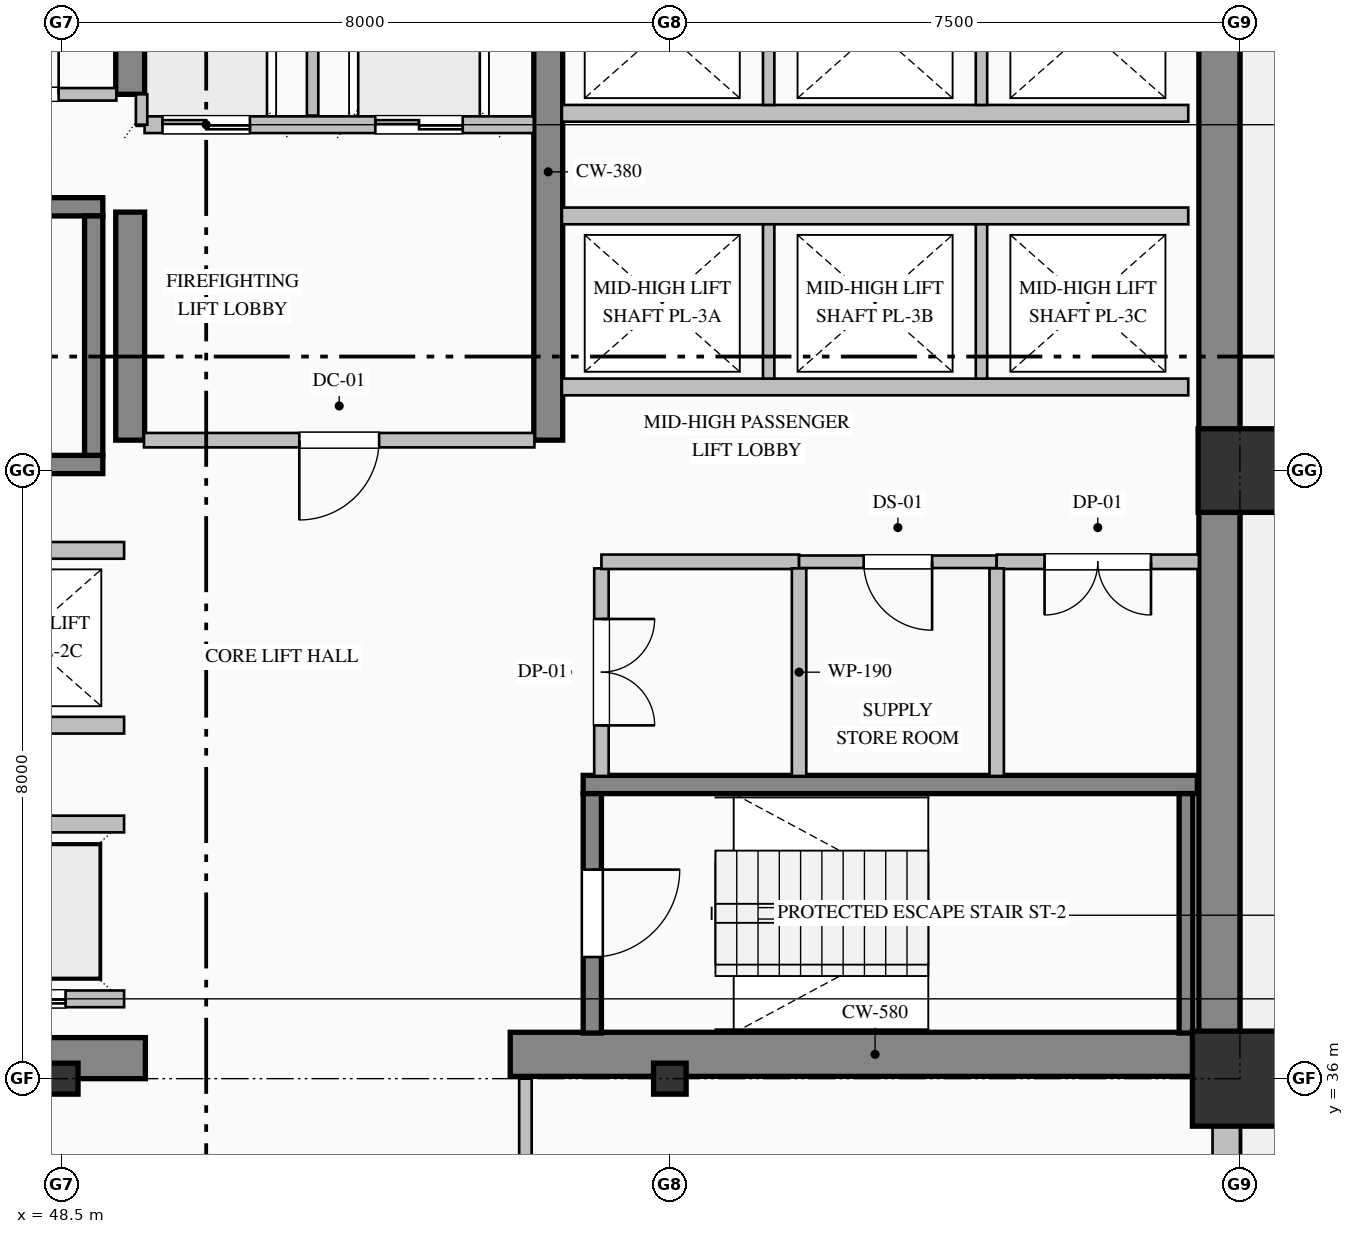
"""IFC4 building model, lengths in metres.
Left out: names, types, materials, properties, quantities, classifications, styles, units other than length and angle.
Written with IfcOpenShell. Run it as: python <this file> out.ifc"""

import sys

from ifc_helpers import new_model, si_unit, direction, frame, frame_2d, origin, origin_2d, place, context, subcontext, project, spatial, rectangle, hollow_rectangle, i_section, extrude, element, fill, save


model = new_model("IFC4")
c1 = context("Model", 3, precision=1e-05, world=origin(), true_north=direction((0.0, 1.0)))
c2 = subcontext(c1, "Body", "Model", "MODEL_VIEW")
j1 = project(units=[si_unit("LENGTHUNIT", "METRE"), si_unit("PLANEANGLEUNIT", "RADIAN")], contexts=[c1])
p1 = place(None, origin())
s1 = spatial("IfcSite", under=j1, at=p1, CompositionType="ELEMENT")
p2 = place(p1, origin())
s2 = spatial("IfcBuilding", under=s1, at=p2, CompositionType="ELEMENT")
p3 = place(p2, frame((0.0, 0.0, 28.2)))
s3 = spatial("IfcBuildingStorey", under=s2, at=p3, CompositionType="ELEMENT", Elevation=28.2)
p4 = place(p3, frame((63.73, 36.32, 0.0), z_axis=(0.0, 0.0, 1.0), x_axis=(0.0, 1.0, 0.0)))
e1 = element("IfcWall", 1, at=p4, inside=s3, PredefinedType="SHEAR", context=c2, shape_type="SweptSolid", body=[
    extrude(rectangle(XDim=15.14, YDim=0.54, at=frame_2d((7.57, 0.0))), origin(), (0.0, 0.0, 1.0), 3.75),
])
p5 = place(p3, frame((48.2, 36.27, 0.0), z_axis=(0.0, 0.0, 1.0), x_axis=(1.0, 0.0, 0.0)))
e2 = element("IfcWall", 2, at=p5, inside=s3, PredefinedType="SHEAR", context=c2, shape_type="SweptSolid", body=[
    extrude(rectangle(XDim=1.4, YDim=0.54, at=frame_2d((0.7, 0.0))), origin(), (0.0, 0.0, 1.0), 3.75),
])
p6 = place(p3, frame((54.4, 36.32, 0.0), z_axis=(0.0, 0.0, 1.0), x_axis=(1.0, 0.0, 0.0)))
e3 = element("IfcWall", 3, at=p6, inside=s3, PredefinedType="SHEAR", context=c2, shape_type="SweptSolid", body=[
    extrude(rectangle(XDim=9.6, YDim=0.58, at=frame_2d((4.8, 0.0))), origin(), (0.0, 0.0, 1.0), 4.0),
])
p7 = place(p3, frame((49.4, 44.4, 0.0), z_axis=(0.0, 0.0, 1.0), x_axis=(0.0, 1.0, 0.0)))
e4 = element("IfcWall", 4, at=p7, inside=s3, PredefinedType="SHEAR", context=c2, shape_type="SweptSolid", body=[
    extrude(rectangle(XDim=3.0, YDim=0.38, at=frame_2d((1.5, 0.0))), origin(), (0.0, 0.0, 1.0), 3.75),
])
p8 = place(p3, frame((49.4, 48.95, 0.0), z_axis=(0.0, 0.0, 1.0), x_axis=(0.0, 1.0, 0.0)))
e5 = element("IfcWall", 5, at=p8, inside=s3, PredefinedType="SHEAR", context=c2, shape_type="SweptSolid", body=[
    extrude(rectangle(XDim=2.51, YDim=0.38, at=frame_2d((1.255, 0.0))), origin(), (0.0, 0.0, 1.0), 3.75),
])
p9 = place(p3, frame((54.9, 44.4, 0.0), z_axis=(0.0, 0.0, 1.0), x_axis=(0.0, 1.0, 0.0)))
e6 = element("IfcWall", 6, at=p9, inside=s3, PredefinedType="SHEAR", context=c2, shape_type="SweptSolid", body=[
    extrude(rectangle(XDim=7.06, YDim=0.38, at=frame_2d((3.53, 0.0))), origin(), (0.0, 0.0, 1.0), 3.75),
])
for number, where, z_axis, x_axis in (
    (7, (48.5, 36.0, 0.0), (0.0, 0.0, 1.0), (1.0, 0.0, 0.0)),
    (8, (56.5, 36.0, 0.0), (0.0, 0.0, 1.0), (1.0, 0.0, 0.0)),
):
    element("IfcColumn", number, at=place(p3, frame(where, z_axis=z_axis, x_axis=x_axis)), inside=s3, PredefinedType="COLUMN", context=c2, shape_type="SweptSolid", body=[
        extrude(i_section(OverallWidth=0.407, OverallDepth=0.428, WebThickness=0.02, FlangeThickness=0.035, FilletRadius=0.022, at=origin_2d()), origin(), (0.0, 0.0, 1.0), 4.0),
    ])
p10 = place(p3, frame((64.0, 36.0, 0.0), z_axis=(0.0, 0.0, 1.0), x_axis=(1.0, 0.0, 0.0)))
e9 = element("IfcColumn", 9, at=p10, inside=s3, PredefinedType="COLUMN", context=c2, shape_type="SweptSolid", body=[
    extrude(hollow_rectangle(XDim=1.25, YDim=1.25, WallThickness=0.045, at=origin_2d()), origin(), (0.0, 0.0, 1.0), 4.0),
])
p11 = place(p3, frame((64.0, 44.0, 0.0), z_axis=(0.0, 0.0, 1.0), x_axis=(1.0, 0.0, 0.0)))
e10 = element("IfcColumn", 10, at=p11, inside=s3, PredefinedType="COLUMN", context=c2, shape_type="SweptSolid", body=[
    extrude(hollow_rectangle(XDim=1.1, YDim=1.1, WallThickness=0.04, at=origin_2d()), origin(), (0.0, 0.0, 1.0), 4.0),
])
p12 = place(p3, frame((63.82, 36.05, 0.0), z_axis=(0.0, 0.0, 1.0), x_axis=(0.0, -1.0, 0.0)))
e11 = element("IfcWall", 11, at=p12, inside=s3, PredefinedType="SOLIDWALL", context=c2, shape_type="SweptSolid", body=[
    extrude(rectangle(XDim=28.05, YDim=0.36, at=frame_2d((14.025, 0.0))), origin(), (0.0, 0.0, 1.0), 3.25),
])
p13 = place(p12, frame((12.0, 0.0, 0.0)))
e12 = element("IfcOpeningElement", 12, at=p13, cuts=e11, PredefinedType="OPENING", context=c2, shape_type="SweptSolid", body=[
    extrude(rectangle(XDim=1.6, YDim=2.35, at=frame_2d((0.8, 1.175))), frame((0.0, 0.19, 0.0), z_axis=(0.0, -1.0, 0.0), x_axis=(1.0, 0.0, 0.0)), (0.0, 0.0, 1.0), 0.38),
])
for number, where, z_axis, x_axis in (
    (13, (40.96, 47.47, 0.0), (0.0, 0.0, 1.0), (1.0, 0.0, 0.0)),
    (14, (49.04, 44.08, 0.0), (0.0, 0.0, 1.0), (-1.0, 0.0, 0.0)),
):
    element("IfcWall", number, at=place(p3, frame(where, z_axis=z_axis, x_axis=x_axis)), inside=s3, PredefinedType="SOLIDWALL", context=c2, shape_type="SweptSolid", body=[
        extrude(rectangle(XDim=8.08, YDim=0.24, at=frame_2d((4.04, 0.0))), origin(), (0.0, 0.0, 1.0), 4.0),
    ])
p14 = place(p3, frame((48.92, 44.2, 0.0), z_axis=(0.0, 0.0, 1.0), x_axis=(0.0, 1.0, 0.0)))
e15 = element("IfcWall", 15, at=p14, inside=s3, PredefinedType="SOLIDWALL", context=c2, shape_type="SweptSolid", body=[
    extrude(rectangle(XDim=3.15, YDim=0.24, at=frame_2d((1.575, 0.0))), origin(), (0.0, 0.0, 1.0), 4.0),
])
p15 = place(p3, frame((55.36, 39.87, 0.0), z_axis=(0.0, 0.0, 1.0), x_axis=(1.0, 0.0, 0.0)))
e16 = element("IfcWall", 16, at=p15, inside=s3, PredefinedType="SOLIDWALL", context=c2, shape_type="SweptSolid", body=[
    extrude(rectangle(XDim=8.08, YDim=0.24, at=frame_2d((4.04, 0.0))), origin(), (0.0, 0.0, 1.0), 4.0),
])
p16 = place(p3, frame((55.48, 39.75, 0.0), z_axis=(0.0, 0.0, 1.0), x_axis=(0.0, -1.0, 0.0)))
e17 = element("IfcWall", 17, at=p16, inside=s3, PredefinedType="SOLIDWALL", context=c2, shape_type="SweptSolid", body=[
    extrude(rectangle(XDim=3.15, YDim=0.24, at=frame_2d((1.575, 0.0))), origin(), (0.0, 0.0, 1.0), 4.0),
])
p17 = place(p16, frame((1.0, 0.0, 0.0)))
e18 = element("IfcOpeningElement", 18, at=p17, cuts=e17, PredefinedType="OPENING", context=c2, shape_type="SweptSolid", body=[
    extrude(rectangle(XDim=1.15, YDim=2.2, at=frame_2d((0.575, 1.1))), frame((0.0, 0.13, 0.0), z_axis=(0.0, -1.0, 0.0), x_axis=(1.0, 0.0, 0.0)), (0.0, 0.0, 1.0), 0.26),
])
p18 = place(p3, frame((63.29, 36.6, 0.0), z_axis=(0.0, 0.0, 1.0), x_axis=(0.0, 1.0, 0.0)))
e19 = element("IfcWall", 19, at=p18, inside=s3, PredefinedType="SOLIDWALL", context=c2, shape_type="SweptSolid", body=[
    extrude(rectangle(XDim=3.15, YDim=0.18, at=frame_2d((1.575, 0.0))), origin(), (0.0, 0.0, 1.0), 4.0),
])
p19 = place(p3, frame((54.71, 48.55, 0.0), z_axis=(0.0, 0.0, 1.0), x_axis=(-1.0, 0.0, 0.0)))
e20 = element("IfcWall", 20, at=p19, inside=s3, PredefinedType="PARTITIONING", context=c2, shape_type="SweptSolid", body=[
    extrude(rectangle(XDim=5.12, YDim=0.22, at=frame_2d((2.56, 0.0))), origin(), (0.0, 0.0, 1.0), 3.75),
])
p20 = place(p19, frame((3.735, 0.0, 0.0)))
e21 = element("IfcOpeningElement", 21, at=p20, cuts=e20, PredefinedType="OPENING", context=c2, shape_type="SweptSolid", body=[
    extrude(rectangle(XDim=1.15, YDim=2.2, at=frame_2d((0.575, 1.1))), frame((0.0, 0.12, 0.0), z_axis=(0.0, -1.0, 0.0), x_axis=(1.0, 0.0, 0.0)), (0.0, 0.0, 1.0), 0.24),
])
p21 = place(p19, frame((0.935, 0.0, 0.0)))
e22 = element("IfcOpeningElement", 22, at=p21, cuts=e20, PredefinedType="OPENING", context=c2, shape_type="SweptSolid", body=[
    extrude(rectangle(XDim=1.15, YDim=2.2, at=frame_2d((0.575, 1.1))), frame((0.0, 0.12, 0.0), z_axis=(0.0, -1.0, 0.0), x_axis=(1.0, 0.0, 0.0)), (0.0, 0.0, 1.0), 0.24),
])
p22 = place(p3, frame((51.8, 48.67, 0.0), z_axis=(0.0, 0.0, 1.0), x_axis=(0.0, 1.0, 0.0)))
e23 = element("IfcWall", 23, at=p22, inside=s3, PredefinedType="PARTITIONING", context=c2, shape_type="SweptSolid", body=[
    extrude(rectangle(XDim=2.79, YDim=0.15, at=frame_2d((1.395, 0.0))), origin(), (0.0, 0.0, 1.0), 3.75),
])
p23 = place(p3, frame((49.55, 48.55, 0.0), z_axis=(0.0, 0.0, 1.0), x_axis=(0.0, 1.0, 0.0)))
e24 = element("IfcWall", 24, at=p23, inside=s3, PredefinedType="PARTITIONING", context=c2, shape_type="SweptSolid", body=[
    extrude(rectangle(XDim=0.4, YDim=0.15, at=frame_2d((0.2, 0.0))), origin(), (0.0, 0.0, 1.0), 3.75),
])
p24 = place(p3, frame((49.32, 37.05, 0.0), z_axis=(0.0, 0.0, 1.0), x_axis=(-1.0, 0.0, 0.0)))
e25 = element("IfcWall", 25, at=p24, inside=s3, PredefinedType="PARTITIONING", context=c2, shape_type="SweptSolid", body=[
    extrude(rectangle(XDim=8.24, YDim=0.22, at=frame_2d((4.12, 0.0))), origin(), (0.0, 0.0, 1.0), 3.75),
])
p25 = place(p24, frame((6.37, 0.0, 0.0)))
e26 = element("IfcOpeningElement", 26, at=p25, cuts=e25, PredefinedType="OPENING", context=c2, shape_type="SweptSolid", body=[
    extrude(rectangle(XDim=1.1, YDim=2.2, at=frame_2d((0.55, 1.1))), frame((0.0, 0.12, 0.0), z_axis=(0.0, -1.0, 0.0), x_axis=(1.0, 0.0, 0.0)), (0.0, 0.0, 1.0), 0.24),
])
p26 = place(p24, frame((3.57, 0.0, 0.0)))
e27 = element("IfcOpeningElement", 27, at=p26, cuts=e25, PredefinedType="OPENING", context=c2, shape_type="SweptSolid", body=[
    extrude(rectangle(XDim=1.1, YDim=2.2, at=frame_2d((0.55, 1.1))), frame((0.0, 0.12, 0.0), z_axis=(0.0, -1.0, 0.0), x_axis=(1.0, 0.0, 0.0)), (0.0, 0.0, 1.0), 0.24),
])
p27 = place(p24, frame((0.77, 0.0, 0.0)))
e28 = element("IfcOpeningElement", 28, at=p27, cuts=e25, PredefinedType="OPENING", context=c2, shape_type="SweptSolid", body=[
    extrude(rectangle(XDim=1.1, YDim=2.2, at=frame_2d((0.55, 1.1))), frame((0.0, 0.12, 0.0), z_axis=(0.0, -1.0, 0.0), x_axis=(1.0, 0.0, 0.0)), (0.0, 0.0, 1.0), 0.24),
])
for number, where, z_axis, x_axis in (
    (29, (41.08, 39.35, 0.0), (0.0, 0.0, 1.0), (1.0, 0.0, 0.0)),
    (30, (49.32, 40.65, 0.0), (0.0, 0.0, 1.0), (-1.0, 0.0, 0.0)),
    (31, (41.08, 42.95, 0.0), (0.0, 0.0, 1.0), (1.0, 0.0, 0.0)),
    (32, (63.32, 45.1, 0.0), (0.0, 0.0, 1.0), (-1.0, 0.0, 0.0)),
    (33, (55.08, 47.35, 0.0), (0.0, 0.0, 1.0), (1.0, 0.0, 0.0)),
):
    element("IfcWall", number, at=place(p3, frame(where, z_axis=z_axis, x_axis=x_axis)), inside=s3, PredefinedType="PARTITIONING", context=c2, shape_type="SweptSolid", body=[
        extrude(rectangle(XDim=8.24, YDim=0.22, at=frame_2d((4.12, 0.0))), origin(), (0.0, 0.0, 1.0), 3.75),
    ])
for number, where, z_axis, x_axis in (
    (34, (57.8, 45.21, 0.0), (0.0, 0.0, 1.0), (0.0, 1.0, 0.0)),
    (35, (60.6, 45.21, 0.0), (0.0, 0.0, 1.0), (0.0, 1.0, 0.0)),
):
    element("IfcWall", number, at=place(p3, frame(where, z_axis=z_axis, x_axis=x_axis)), inside=s3, PredefinedType="PARTITIONING", context=c2, shape_type="SweptSolid", body=[
        extrude(rectangle(XDim=2.03, YDim=0.15, at=frame_2d((1.015, 0.0))), origin(), (0.0, 0.0, 1.0), 3.75),
    ])
p28 = place(p3, frame((63.32, 48.7, 0.0), z_axis=(0.0, 0.0, 1.0), x_axis=(-1.0, 0.0, 0.0)))
e36 = element("IfcWall", 36, at=p28, inside=s3, PredefinedType="PARTITIONING", context=c2, shape_type="SweptSolid", body=[
    extrude(rectangle(XDim=8.24, YDim=0.22, at=frame_2d((4.12, 0.0))), origin(), (0.0, 0.0, 1.0), 3.75),
])
for number, where, z_axis, x_axis in (
    (37, (57.8, 48.81, 0.0), (0.0, 0.0, 1.0), (0.0, 1.0, 0.0)),
    (38, (60.6, 48.81, 0.0), (0.0, 0.0, 1.0), (0.0, 1.0, 0.0)),
):
    element("IfcWall", number, at=place(p3, frame(where, z_axis=z_axis, x_axis=x_axis)), inside=s3, PredefinedType="PARTITIONING", context=c2, shape_type="SweptSolid", body=[
        extrude(rectangle(XDim=2.65, YDim=0.15, at=frame_2d((1.325, 0.0))), origin(), (0.0, 0.0, 1.0), 3.75),
    ])
p29 = place(p3, frame((46.8, 48.95, 0.0), z_axis=(0.0, 0.0, 1.0), x_axis=(1.0, 0.0, 0.0)))
e39 = element("IfcWall", 39, at=p29, inside=s3, PredefinedType="PARTITIONING", context=c2, shape_type="SweptSolid", body=[
    extrude(rectangle(XDim=2.418, YDim=0.165, at=frame_2d((1.209, 0.0))), origin(), (0.0, 0.0, 1.0), 3.75),
])
p30 = place(p29, frame((0.759, 0.0, 0.0)))
e40 = element("IfcOpeningElement", 40, at=p30, cuts=e39, PredefinedType="OPENING", context=c2, shape_type="SweptSolid", body=[
    extrude(rectangle(XDim=0.9, YDim=2.15, at=frame_2d((0.45, 1.075))), frame((0.0, 0.093, 0.0), z_axis=(0.0, -1.0, 0.0), x_axis=(1.0, 0.0, 0.0)), (0.0, 0.0, 1.0), 0.185),
])
p31 = place(p3, frame((54.718, 44.4, 0.0), z_axis=(0.0, 0.0, 1.0), x_axis=(-1.0, 0.0, 0.0)))
e41 = element("IfcWall", 41, at=p31, inside=s3, PredefinedType="PARTITIONING", context=c2, shape_type="SweptSolid", body=[
    extrude(rectangle(XDim=5.136, YDim=0.19, at=frame_2d((2.568, 0.0))), origin(), (0.0, 0.0, 1.0), 3.75),
])
p32 = place(p31, frame((2.043, 0.0, 0.0)))
e42 = element("IfcOpeningElement", 42, at=p32, cuts=e41, PredefinedType="OPENING", context=c2, shape_type="SweptSolid", body=[
    extrude(rectangle(XDim=1.05, YDim=2.15, at=frame_2d((0.525, 1.075))), frame((0.0, 0.105, 0.0), z_axis=(0.0, -1.0, 0.0), x_axis=(1.0, 0.0, 0.0)), (0.0, 0.0, 1.0), 0.21),
])
p33 = place(p3, frame((55.6, 42.713, 0.0), z_axis=(0.0, 0.0, 1.0), x_axis=(0.0, -1.0, 0.0)))
e43 = element("IfcWall", 43, at=p33, inside=s3, PredefinedType="PARTITIONING", context=c2, shape_type="SweptSolid", body=[
    extrude(rectangle(XDim=2.731, YDim=0.19, at=frame_2d((1.365, 0.0))), origin(), (0.0, 0.0, 1.0), 3.75),
])
p34 = place(p33, frame((0.666, 0.0, 0.0)))
e44 = element("IfcOpeningElement", 44, at=p34, cuts=e43, PredefinedType="OPENING", context=c2, shape_type="SweptSolid", body=[
    extrude(rectangle(XDim=1.4, YDim=2.25, at=frame_2d((0.7, 1.125))), frame((0.0, 0.105, 0.0), z_axis=(0.0, -1.0, 0.0), x_axis=(1.0, 0.0, 0.0)), (0.0, 0.0, 1.0), 0.21),
])
p35 = place(p3, frame((58.2, 42.8, 0.0), z_axis=(0.0, 0.0, 1.0), x_axis=(-1.0, 0.0, 0.0)))
e45 = element("IfcWall", 45, at=p35, inside=s3, PredefinedType="PARTITIONING", context=c2, shape_type="SweptSolid", body=[
    extrude(rectangle(XDim=2.6, YDim=0.19, at=frame_2d((1.3, 0.0))), origin(), (0.0, 0.0, 1.0), 3.75),
])
p36 = place(p3, frame((60.8, 42.8, 0.0), z_axis=(0.0, 0.0, 1.0), x_axis=(-1.0, 0.0, 0.0)))
e46 = element("IfcWall", 46, at=p36, inside=s3, PredefinedType="PARTITIONING", context=c2, shape_type="SweptSolid", body=[
    extrude(rectangle(XDim=2.6, YDim=0.165, at=frame_2d((1.3, 0.0))), origin(), (0.0, 0.0, 1.0), 3.75),
])
p37 = place(p36, frame((0.85, 0.0, 0.0)))
e47 = element("IfcOpeningElement", 47, at=p37, cuts=e46, PredefinedType="OPENING", context=c2, shape_type="SweptSolid", body=[
    extrude(rectangle(XDim=0.9, YDim=2.15, at=frame_2d((0.45, 1.075))), frame((0.0, 0.093, 0.0), z_axis=(0.0, -1.0, 0.0), x_axis=(1.0, 0.0, 0.0)), (0.0, 0.0, 1.0), 0.185),
])
p38 = place(p3, frame((63.46, 42.8, 0.0), z_axis=(0.0, 0.0, 1.0), x_axis=(-1.0, 0.0, 0.0)))
e48 = element("IfcWall", 48, at=p38, inside=s3, PredefinedType="PARTITIONING", context=c2, shape_type="SweptSolid", body=[
    extrude(rectangle(XDim=2.66, YDim=0.19, at=frame_2d((1.33, 0.0))), origin(), (0.0, 0.0, 1.0), 3.75),
])
p39 = place(p38, frame((0.63, 0.0, 0.0)))
e49 = element("IfcOpeningElement", 49, at=p39, cuts=e48, PredefinedType="OPENING", context=c2, shape_type="SweptSolid", body=[
    extrude(rectangle(XDim=1.4, YDim=2.25, at=frame_2d((0.7, 1.125))), frame((0.0, 0.105, 0.0), z_axis=(0.0, -1.0, 0.0), x_axis=(1.0, 0.0, 0.0)), (0.0, 0.0, 1.0), 0.21),
])
for number, where, z_axis, x_axis in (
    (50, (58.2, 42.713, 0.0), (0.0, 0.0, 1.0), (0.0, -1.0, 0.0)),
    (51, (60.8, 42.713, 0.0), (0.0, 0.0, 1.0), (0.0, -1.0, 0.0)),
):
    element("IfcWall", number, at=place(p3, frame(where, z_axis=z_axis, x_axis=x_axis)), inside=s3, PredefinedType="PARTITIONING", context=c2, shape_type="SweptSolid", body=[
        extrude(rectangle(XDim=2.731, YDim=0.19, at=frame_2d((1.365, 0.0))), origin(), (0.0, 0.0, 1.0), 3.75),
    ])
p40 = place(p3, frame((54.6, 36.0, 0.0), z_axis=(0.0, 0.0, 1.0), x_axis=(0.0, -1.0, 0.0)))
e52 = element("IfcWall", 52, at=p40, inside=s3, PredefinedType="PARTITIONING", context=c2, shape_type="SweptSolid", body=[
    extrude(rectangle(XDim=2.125, YDim=0.165, at=frame_2d((1.063, 0.0))), origin(), (0.0, 0.0, 1.0), 3.75),
])
p41 = place(p17, origin())
e53 = element("IfcDoor", 53, at=p41, inside=s3, OperationType="SINGLE_SWING_LEFT", PredefinedType="DOOR", context=c2, shape_type="SweptSolid", body=[
    extrude(rectangle(XDim=1.15, YDim=2.2, at=frame_2d((0.575, 1.1))), frame((0.0, 0.025, 0.0), z_axis=(0.0, -1.0, 0.0), x_axis=(1.0, 0.0, 0.0)), (0.0, 0.0, 1.0), 0.05),
])
fill(e18, e53)
p42 = place(p20, origin())
e54 = element("IfcDoor", 54, at=p42, inside=s3, OperationType="DOUBLE_DOOR_SLIDING", PredefinedType="DOOR", context=c2, shape_type="SweptSolid", body=[
    extrude(rectangle(XDim=1.15, YDim=2.2, at=frame_2d((0.575, 1.1))), frame((0.0, 0.025, 0.0), z_axis=(0.0, -1.0, 0.0), x_axis=(1.0, 0.0, 0.0)), (0.0, 0.0, 1.0), 0.05),
])
fill(e21, e54)
p43 = place(p21, origin())
e55 = element("IfcDoor", 55, at=p43, inside=s3, OperationType="DOUBLE_DOOR_SLIDING", PredefinedType="DOOR", context=c2, shape_type="SweptSolid", body=[
    extrude(rectangle(XDim=1.15, YDim=2.2, at=frame_2d((0.575, 1.1))), frame((0.0, 0.025, 0.0), z_axis=(0.0, -1.0, 0.0), x_axis=(1.0, 0.0, 0.0)), (0.0, 0.0, 1.0), 0.05),
])
fill(e22, e55)
p44 = place(p27, origin())
e56 = element("IfcDoor", 56, at=p44, inside=s3, OperationType="DOUBLE_DOOR_SLIDING", PredefinedType="DOOR", context=c2, shape_type="SweptSolid", body=[
    extrude(rectangle(XDim=1.1, YDim=2.2, at=frame_2d((0.55, 1.1))), frame((0.0, 0.025, 0.0), z_axis=(0.0, -1.0, 0.0), x_axis=(1.0, 0.0, 0.0)), (0.0, 0.0, 1.0), 0.05),
])
fill(e28, e56)
p45 = place(p32, origin())
e57 = element("IfcDoor", 57, at=p45, inside=s3, OperationType="SINGLE_SWING_RIGHT", PredefinedType="DOOR", context=c2, shape_type="SweptSolid", body=[
    extrude(rectangle(XDim=1.05, YDim=2.15, at=frame_2d((0.525, 1.075))), frame((0.0, 0.025, 0.0), z_axis=(0.0, -1.0, 0.0), x_axis=(1.0, 0.0, 0.0)), (0.0, 0.0, 1.0), 0.05),
])
fill(e42, e57)
p46 = place(p30, origin())
e58 = element("IfcDoor", 58, at=p46, inside=s3, OperationType="SINGLE_SWING_RIGHT", PredefinedType="DOOR", context=c2, shape_type="SweptSolid", body=[
    extrude(rectangle(XDim=0.9, YDim=2.15, at=frame_2d((0.45, 1.075))), frame((0.0, 0.025, 0.0), z_axis=(0.0, -1.0, 0.0), x_axis=(1.0, 0.0, 0.0)), (0.0, 0.0, 1.0), 0.05),
])
fill(e40, e58)
p47 = place(p34, origin())
e59 = element("IfcDoor", 59, at=p47, inside=s3, OperationType="DOUBLE_DOOR_SINGLE_SWING", PredefinedType="DOOR", context=c2, shape_type="SweptSolid", body=[
    extrude(rectangle(XDim=1.4, YDim=2.25, at=frame_2d((0.7, 1.125))), frame((0.0, 0.025, 0.0), z_axis=(0.0, -1.0, 0.0), x_axis=(1.0, 0.0, 0.0)), (0.0, 0.0, 1.0), 0.05),
])
fill(e44, e59)
p48 = place(p37, origin())
e60 = element("IfcDoor", 60, at=p48, inside=s3, OperationType="SINGLE_SWING_LEFT", PredefinedType="DOOR", context=c2, shape_type="SweptSolid", body=[
    extrude(rectangle(XDim=0.9, YDim=2.15, at=frame_2d((0.45, 1.075))), frame((0.0, 0.025, 0.0), z_axis=(0.0, -1.0, 0.0), x_axis=(1.0, 0.0, 0.0)), (0.0, 0.0, 1.0), 0.05),
])
fill(e47, e60)
p49 = place(p39, origin())
e61 = element("IfcDoor", 61, at=p49, inside=s3, OperationType="DOUBLE_DOOR_SINGLE_SWING", PredefinedType="DOOR", context=c2, shape_type="SweptSolid", body=[
    extrude(rectangle(XDim=1.4, YDim=2.25, at=frame_2d((0.7, 1.125))), frame((0.0, 0.025, 0.0), z_axis=(0.0, -1.0, 0.0), x_axis=(1.0, 0.0, 0.0)), (0.0, 0.0, 1.0), 0.05),
])
fill(e49, e61)
save(model, sys.argv[1])
